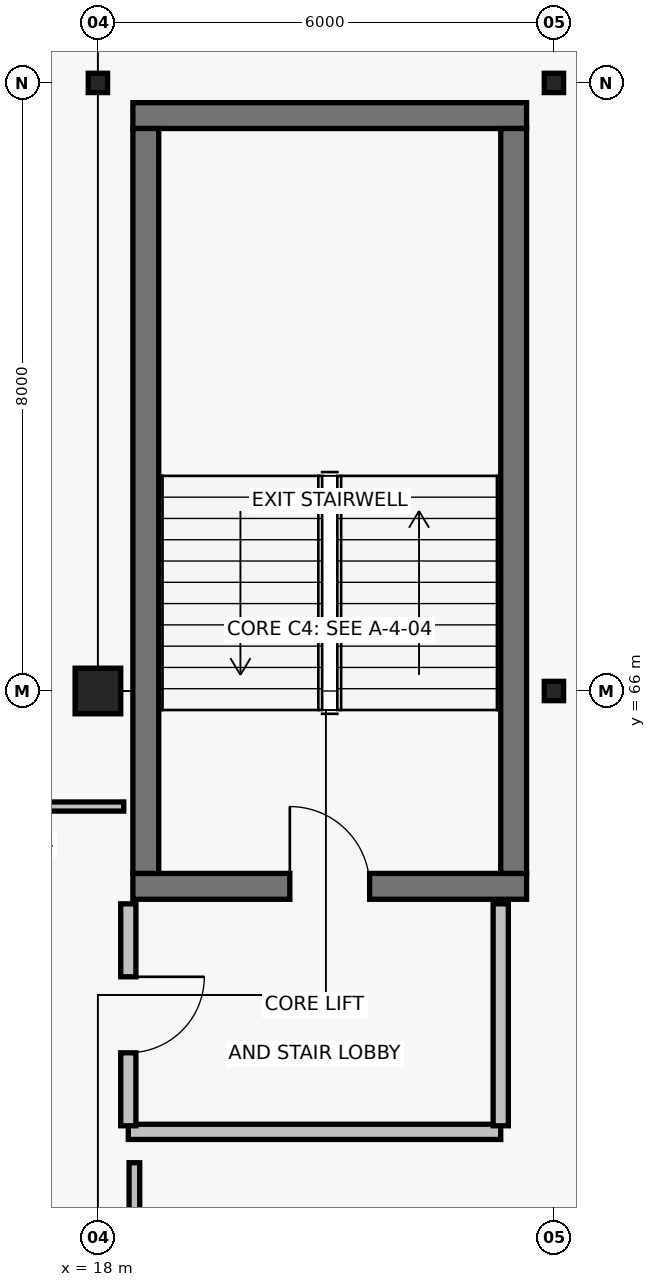
"""IFC4 building model, lengths in metres.
Left out: names, types, materials, properties, quantities, classifications, styles, units other than length and angle.
Written with IfcOpenShell. Run it as: python <this file> out.ifc"""

import sys

from ifc_helpers import new_model, si_unit, direction, frame, frame_2d, origin, origin_2d, place, context, subcontext, project, spatial, rectangle, hollow_rectangle, extrude, element, fill, save


model = new_model("IFC4")
c1 = context("Model", 3, precision=1e-05, world=origin(), true_north=direction((0.0, 1.0)))
c2 = subcontext(c1, "Body", "Model", "MODEL_VIEW")
j1 = project(units=[si_unit("LENGTHUNIT", "METRE"), si_unit("PLANEANGLEUNIT", "RADIAN")], contexts=[c1])
p1 = place(None, origin())
s1 = spatial("IfcSite", under=j1, at=p1, CompositionType="ELEMENT")
p2 = place(p1, origin())
s2 = spatial("IfcBuilding", under=s1, at=p2, CompositionType="ELEMENT")
p3 = place(p2, frame((0.0, 0.0, 11.4)))
s3 = spatial("IfcBuildingStorey", under=s2, at=p3, CompositionType="ELEMENT", Elevation=11.4)
p4 = place(p3, frame((18.0, 66.0, 0.0), z_axis=(0.0, 0.0, 1.0), x_axis=(1.0, 0.0, 0.0)))
e1 = element("IfcColumn", 1, at=p4, inside=s3, PredefinedType="COLUMN", context=c2, shape_type="SweptSolid", body=[
    extrude(rectangle(XDim=0.6, YDim=0.6, at=origin_2d()), origin(), (0.0, 0.0, 1.0), 4.0),
])
for number, where, z_axis, x_axis in (
    (2, (18.0, 74.0, 0.0), (0.0, 0.0, 1.0), (1.0, 0.0, 0.0)),
    (3, (24.0, 66.0, 0.0), (0.0, 0.0, 1.0), (1.0, 0.0, 0.0)),
    (4, (24.0, 74.0, 0.0), (0.0, 0.0, 1.0), (1.0, 0.0, 0.0)),
):
    element("IfcColumn", number, at=place(p3, frame(where, z_axis=z_axis, x_axis=x_axis)), inside=s3, PredefinedType="COLUMN", context=c2, shape_type="SweptSolid", body=[
        extrude(hollow_rectangle(XDim=0.254, YDim=0.254, WallThickness=0.01, InnerFilletRadius=0.01, OuterFilletRadius=0.019, at=origin_2d()), origin(), (0.0, 0.0, 1.0), 4.0),
    ])
p5 = place(p3, frame((18.46, 63.43, 0.0), z_axis=(0.0, 0.0, 1.0), x_axis=(1.0, 0.0, 0.0)))
e5 = element("IfcWall", 5, at=p5, inside=s3, PredefinedType="SHEAR", context=c2, shape_type="SweptSolid", body=[
    extrude(rectangle(XDim=5.18, YDim=0.34, at=frame_2d((2.59, 0.0))), origin(), (0.0, 0.0, 1.0), 3.76),
])
p6 = place(p5, frame((2.065, 0.0, 0.0)))
e6 = element("IfcOpeningElement", 6, at=p6, cuts=e5, PredefinedType="OPENING", context=c2, shape_type="SweptSolid", body=[
    extrude(rectangle(XDim=1.05, YDim=2.15, at=frame_2d((0.525, 1.075))), frame((0.0, 0.185, 0.0), z_axis=(0.0, -1.0, 0.0), x_axis=(1.0, 0.0, 0.0)), (0.0, 0.0, 1.0), 0.37),
])
p7 = place(p3, frame((23.64, 73.57, 0.0), z_axis=(0.0, 0.0, 1.0), x_axis=(-1.0, 0.0, 0.0)))
e7 = element("IfcWall", 7, at=p7, inside=s3, PredefinedType="SHEAR", context=c2, shape_type="SweptSolid", body=[
    extrude(rectangle(XDim=5.18, YDim=0.34, at=frame_2d((2.59, 0.0))), origin(), (0.0, 0.0, 1.0), 3.76),
])
for number, where, z_axis, x_axis in (
    (8, (18.63, 73.4, 0.0), (0.0, 0.0, 1.0), (0.0, -1.0, 0.0)),
    (9, (23.47, 63.6, 0.0), (0.0, 0.0, 1.0), (0.0, 1.0, 0.0)),
):
    element("IfcWall", number, at=place(p3, frame(where, z_axis=z_axis, x_axis=x_axis)), inside=s3, PredefinedType="SHEAR", context=c2, shape_type="SweptSolid", body=[
        extrude(rectangle(XDim=9.8, YDim=0.34, at=frame_2d((4.9, 0.0))), origin(), (0.0, 0.0, 1.0), 3.76),
    ])
p8 = place(p3, frame((18.4, 60.2, 0.0), z_axis=(0.0, 0.0, 1.0), x_axis=(1.0, 0.0, 0.0)))
e10 = element("IfcWall", 10, at=p8, inside=s3, PredefinedType="PARTITIONING", context=c2, shape_type="SweptSolid", body=[
    extrude(rectangle(XDim=4.9, YDim=0.2, at=frame_2d((2.45, 0.0))), origin(), (0.0, 0.0, 1.0), 2.957),
])
p9 = place(p3, frame((18.4, 63.2, 0.0), z_axis=(0.0, 0.0, 1.0), x_axis=(0.0, -1.0, 0.0)))
e11 = element("IfcWall", 11, at=p9, inside=s3, PredefinedType="PARTITIONING", context=c2, shape_type="SweptSolid", body=[
    extrude(rectangle(XDim=2.92, YDim=0.2, at=frame_2d((1.46, 0.0))), origin(), (0.0, 0.0, 1.0), 2.957),
])
p10 = place(p9, frame((0.96, 0.0, 0.0)))
e12 = element("IfcOpeningElement", 12, at=p10, cuts=e11, PredefinedType="OPENING", context=c2, shape_type="SweptSolid", body=[
    extrude(rectangle(XDim=1.0, YDim=2.15, at=frame_2d((0.5, 1.075))), frame((0.0, 0.115, 0.0), z_axis=(0.0, -1.0, 0.0), x_axis=(1.0, 0.0, 0.0)), (0.0, 0.0, 1.0), 0.23),
])
p11 = place(p3, frame((23.3, 60.28, 0.0), z_axis=(0.0, 0.0, 1.0), x_axis=(0.0, 1.0, 0.0)))
e13 = element("IfcWall", 13, at=p11, inside=s3, PredefinedType="PARTITIONING", context=c2, shape_type="SweptSolid", body=[
    extrude(rectangle(XDim=2.92, YDim=0.2, at=frame_2d((1.46, 0.0))), origin(), (0.0, 0.0, 1.0), 3.68),
])
p12 = place(p3, frame((18.48, 32.93, 0.0), z_axis=(0.0, 0.0, 1.0), x_axis=(0.0, 1.0, 0.0)))
e14 = element("IfcWall", 14, at=p12, inside=s3, PredefinedType="PARTITIONING", context=c2, shape_type="SweptSolid", body=[
    extrude(rectangle(XDim=26.864, YDim=0.14, at=frame_2d((13.432, 0.0))), origin(), (0.0, 0.0, 1.0), 3.187),
])
p13 = place(p12, frame((12.952, 0.0, 0.0)))
e15 = element("IfcOpeningElement", 15, at=p13, cuts=e14, PredefinedType="OPENING", context=c2, shape_type="SweptSolid", body=[
    extrude(rectangle(XDim=0.96, YDim=2.1, at=frame_2d((0.48, 1.05))), frame((0.0, 0.085, 0.0), z_axis=(0.0, -1.0, 0.0), x_axis=(1.0, 0.0, 0.0)), (0.0, 0.0, 1.0), 0.17),
])
p14 = place(p3, frame((18.34, 64.48, 0.0), z_axis=(0.0, 0.0, 1.0), x_axis=(-1.0, 0.0, 0.0)))
e16 = element("IfcWall", 16, at=p14, inside=s3, PredefinedType="PARTITIONING", context=c2, shape_type="SweptSolid", body=[
    extrude(rectangle(XDim=6.17, YDim=0.12, at=frame_2d((3.085, 0.0))), origin(), (0.0, 0.0, 1.0), 2.957),
])
p15 = place(p14, frame((2.575, 0.0, 0.0)))
e17 = element("IfcOpeningElement", 17, at=p15, cuts=e16, PredefinedType="OPENING", context=c2, shape_type="SweptSolid", body=[
    extrude(rectangle(XDim=1.02, YDim=2.1, at=frame_2d((0.51, 1.05))), frame((0.0, 0.075, 0.0), z_axis=(0.0, -1.0, 0.0), x_axis=(1.0, 0.0, 0.0)), (0.0, 0.0, 1.0), 0.15),
])
p16 = place(p6, origin())
e18 = element("IfcDoor", 18, at=p16, inside=s3, OperationType="SINGLE_SWING_LEFT", PredefinedType="DOOR", context=c2, shape_type="SweptSolid", body=[
    extrude(rectangle(XDim=1.05, YDim=2.15, at=frame_2d((0.525, 1.075))), frame((0.0, 0.025, 0.0), z_axis=(0.0, -1.0, 0.0), x_axis=(1.0, 0.0, 0.0)), (0.0, 0.0, 1.0), 0.05),
])
fill(e6, e18)
p17 = place(p10, origin())
e19 = element("IfcDoor", 19, at=p17, inside=s3, OperationType="SINGLE_SWING_LEFT", PredefinedType="DOOR", context=c2, shape_type="SweptSolid", body=[
    extrude(rectangle(XDim=1.0, YDim=2.15, at=frame_2d((0.5, 1.075))), frame((0.0, 0.025, 0.0), z_axis=(0.0, -1.0, 0.0), x_axis=(1.0, 0.0, 0.0)), (0.0, 0.0, 1.0), 0.05),
])
fill(e12, e19)
save(model, sys.argv[1])
